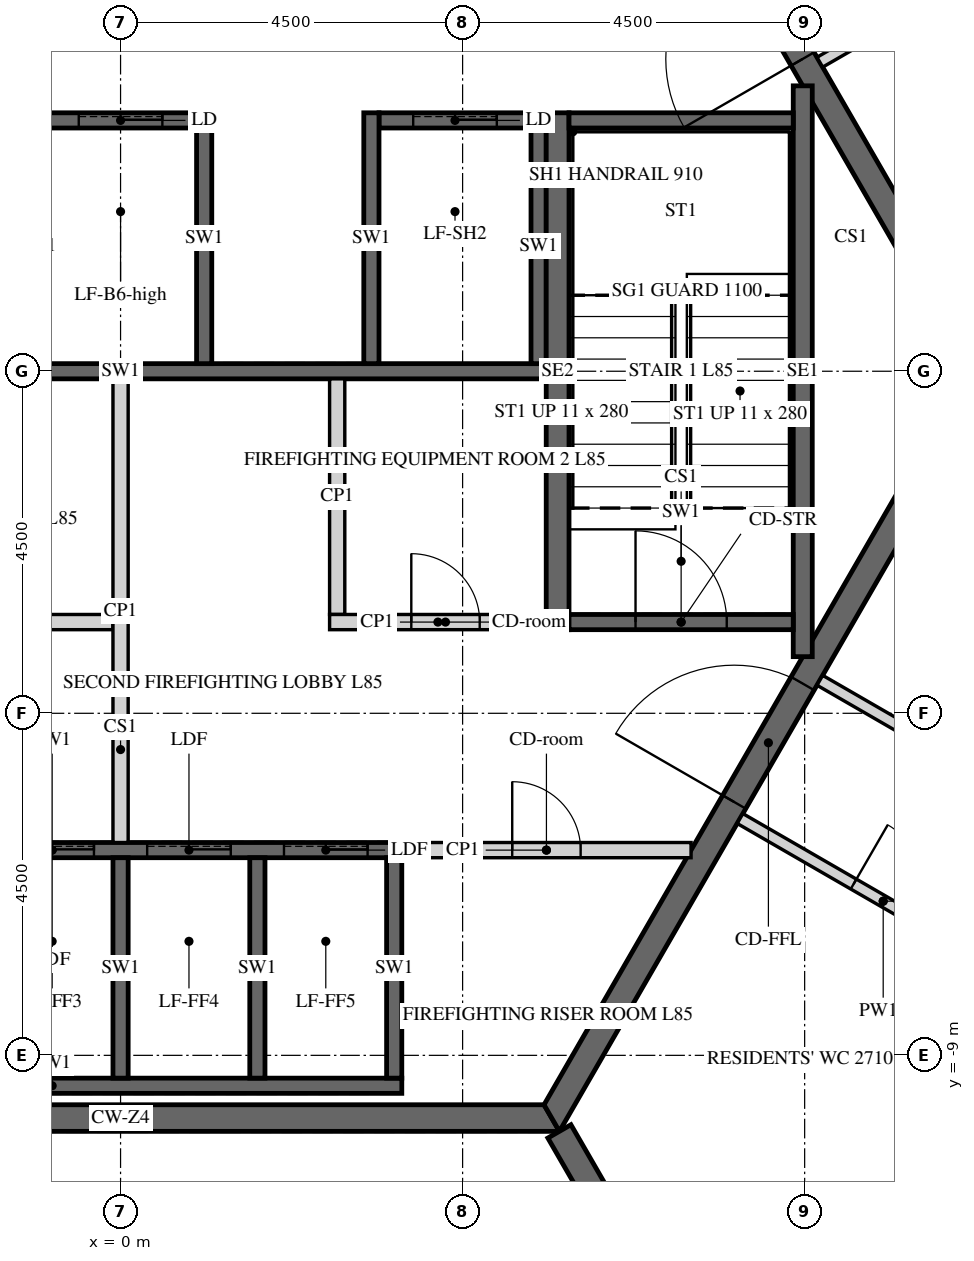
"""IFC4 building model, lengths in metres.
Left out: names, types, materials, properties, quantities, classifications, styles, units other than length and angle.
Written with IfcOpenShell. Run it as: python <this file> out.ifc"""

import sys

from ifc_helpers import new_model, si_unit, direction, frame, frame_2d, origin, place, context, subcontext, project, spatial, polyline, rectangle, outline, extrude, element, fill, save


model = new_model("IFC4")
c1 = context("Model", 3, precision=1e-05, world=origin(), true_north=direction((0.0, 1.0)))
c2 = subcontext(c1, "Body", "Model", "MODEL_VIEW")
j1 = project(units=[si_unit("LENGTHUNIT", "METRE"), si_unit("PLANEANGLEUNIT", "RADIAN")], contexts=[c1])
p1 = place(None, origin())
s1 = spatial("IfcSite", under=j1, at=p1, CompositionType="ELEMENT")
p2 = place(p1, origin())
s2 = spatial("IfcBuilding", under=s1, at=p2, CompositionType="ELEMENT")
p3 = place(p2, frame((0.0, 0.0, 353.4)))
s3 = spatial("IfcBuildingStorey", under=s2, at=p3, CompositionType="ELEMENT", Elevation=353.4)
p4 = place(p3, frame((-5.673, -9.825, -0.15), z_axis=(0.0, 0.0, 1.0), x_axis=(1.0, 0.0, 0.0)))
e1 = element("IfcWall", 1, at=p4, inside=s3, PredefinedType="SHEAR", context=c2, shape_type="SweptSolid", body=[
    extrude(outline(polyline([(-0.101, -0.175), (11.446, -0.175), (11.244, 0.175), (0.101, 0.175), (-0.101, -0.175)])), origin(), (0.0, 0.0, 1.0), 3.9),
])
p5 = place(p3, frame((5.673, -9.825, -0.15), z_axis=(0.0, 0.0, 1.0), x_axis=(0.499995046907, 0.866028263435, 0.0)))
e2 = element("IfcWall", 2, at=p5, inside=s3, PredefinedType="SHEAR", context=c2, shape_type="SweptSolid", body=[
    extrude(outline(polyline([(-0.101, -0.175), (11.446, -0.175), (11.244, 0.175), (0.101, 0.175), (-0.101, -0.175)])), origin(), (0.0, 0.0, 1.0), 3.9),
])
p6 = place(p5, frame((4.801, 0.0, 0.15)))
e3 = element("IfcOpeningElement", 3, at=p6, cuts=e2, PredefinedType="OPENING", context=c2, shape_type="SweptSolid", body=[
    extrude(rectangle(XDim=1.8, YDim=2.4, at=frame_2d((0.9, 1.2))), frame((0.0, 0.185, 0.0), z_axis=(0.0, -1.0, 0.0), x_axis=(1.0, 0.0, 0.0)), (0.0, 0.0, 1.0), 0.37),
])
p7 = place(p3, frame((11.345, 0.0, -0.15), z_axis=(0.0, 0.0, 1.0), x_axis=(-0.499995046907, 0.866028263435, 0.0)))
e4 = element("IfcWall", 4, at=p7, inside=s3, PredefinedType="SHEAR", context=c2, shape_type="SweptSolid", body=[
    extrude(outline(polyline([(-0.101, -0.175), (11.446, -0.175), (11.244, 0.175), (0.101, 0.175), (-0.101, -0.175)])), origin(), (0.0, 0.0, 1.0), 3.9),
])
p8 = place(p7, frame((4.744, 0.0, 0.15)))
e5 = element("IfcOpeningElement", 5, at=p8, cuts=e4, PredefinedType="OPENING", context=c2, shape_type="SweptSolid", body=[
    extrude(rectangle(XDim=1.8, YDim=2.4, at=frame_2d((0.9, 1.2))), frame((0.0, 0.185, 0.0), z_axis=(0.0, -1.0, 0.0), x_axis=(1.0, 0.0, 0.0)), (0.0, 0.0, 1.0), 0.37),
])
p9 = place(p3, frame((5.773, -10.0, -0.15), z_axis=(0.0, 0.0, 1.0), x_axis=(0.500007911273, -0.866020836161, 0.0)))
e6 = element("IfcWall", 6, at=p9, inside=s3, PredefinedType="SHEAR", context=c2, shape_type="SweptSolid", body=[
    extrude(rectangle(XDim=14.51, YDim=0.35, at=frame_2d((7.255, 0.0))), origin(), (0.0, 0.0, 1.0), 3.9),
])
p10 = place(p9, frame((6.355, 0.0, 0.15)))
e7 = element("IfcOpeningElement", 7, at=p10, cuts=e6, PredefinedType="OPENING", context=c2, shape_type="SweptSolid", body=[
    extrude(rectangle(XDim=1.8, YDim=2.4, at=frame_2d((0.9, 1.2))), frame((0.0, 0.185, 0.0), z_axis=(0.0, -1.0, 0.0), x_axis=(1.0, 0.0, 0.0)), (0.0, 0.0, 1.0), 0.37),
])
p11 = place(p3, frame((-5.6, 3.3, -0.25), z_axis=(0.0, 0.0, 1.0), x_axis=(1.0, 0.0, 0.0)))
e8 = element("IfcWall", 8, at=p11, inside=s3, PredefinedType="SHEAR", context=c2, shape_type="SweptSolid", body=[
    extrude(rectangle(XDim=6.6, YDim=0.2, at=frame_2d((3.3, 0.0))), origin(), (0.0, 0.0, 1.0), 3.9),
])
p12 = place(p11, frame((0.65, 0.0, 0.25)))
e9 = element("IfcOpeningElement", 9, at=p12, cuts=e8, PredefinedType="OPENING", context=c2, shape_type="SweptSolid", body=[
    extrude(rectangle(XDim=1.1, YDim=2.1, at=frame_2d((0.55, 1.05))), frame((0.0, 0.11, 0.0), z_axis=(0.0, -1.0, 0.0), x_axis=(1.0, 0.0, 0.0)), (0.0, 0.0, 1.0), 0.22),
])
p13 = place(p11, frame((2.85, 0.0, 0.25)))
e10 = element("IfcOpeningElement", 10, at=p13, cuts=e8, PredefinedType="OPENING", context=c2, shape_type="SweptSolid", body=[
    extrude(rectangle(XDim=1.1, YDim=2.1, at=frame_2d((0.55, 1.05))), frame((0.0, 0.11, 0.0), z_axis=(0.0, -1.0, 0.0), x_axis=(1.0, 0.0, 0.0)), (0.0, 0.0, 1.0), 0.22),
])
p14 = place(p11, frame((5.05, 0.0, 0.25)))
e11 = element("IfcOpeningElement", 11, at=p14, cuts=e8, PredefinedType="OPENING", context=c2, shape_type="SweptSolid", body=[
    extrude(rectangle(XDim=1.1, YDim=2.1, at=frame_2d((0.55, 1.05))), frame((0.0, 0.11, 0.0), z_axis=(0.0, -1.0, 0.0), x_axis=(1.0, 0.0, 0.0)), (0.0, 0.0, 1.0), 0.22),
])
p15 = place(p3, frame((3.4, 3.3, -0.25), z_axis=(0.0, 0.0, 1.0), x_axis=(1.0, 0.0, 0.0)))
e12 = element("IfcWall", 12, at=p15, inside=s3, PredefinedType="SHEAR", context=c2, shape_type="SweptSolid", body=[
    extrude(rectangle(XDim=2.2, YDim=0.2, at=frame_2d((1.1, 0.0))), origin(), (0.0, 0.0, 1.0), 3.9),
])
p16 = place(p15, frame((0.45, 0.0, 0.25)))
e13 = element("IfcOpeningElement", 13, at=p16, cuts=e12, PredefinedType="OPENING", context=c2, shape_type="SweptSolid", body=[
    extrude(rectangle(XDim=1.1, YDim=2.1, at=frame_2d((0.55, 1.05))), frame((0.0, 0.11, 0.0), z_axis=(0.0, -1.0, 0.0), x_axis=(1.0, 0.0, 0.0)), (0.0, 0.0, 1.0), 0.22),
])
p17 = place(p3, frame((-5.6, 0.0, -0.25), z_axis=(0.0, 0.0, 1.0), x_axis=(1.0, 0.0, 0.0)))
e14 = element("IfcWall", 14, at=p17, inside=s3, PredefinedType="SHEAR", context=c2, shape_type="SweptSolid", body=[
    extrude(rectangle(XDim=11.2, YDim=0.2, at=frame_2d((5.6, 0.0))), origin(), (0.0, 0.0, 1.0), 3.9),
])
for number, where, z_axis, x_axis in (
    (15, (1.1, 0.1, -0.25), (0.0, 0.0, 1.0), (0.0, 1.0, 0.0)),
    (16, (3.3, 0.1, -0.25), (0.0, 0.0, 1.0), (0.0, 1.0, 0.0)),
):
    element("IfcWall", number, at=place(p3, frame(where, z_axis=z_axis, x_axis=x_axis)), inside=s3, PredefinedType="SHEAR", context=c2, shape_type="SweptSolid", body=[
        extrude(rectangle(XDim=3.3, YDim=0.2, at=frame_2d((1.65, 0.0))), origin(), (0.0, 0.0, 1.0), 3.9),
    ])
p18 = place(p3, frame((5.5, 0.1, -0.25), z_axis=(0.0, 0.0, 1.0), x_axis=(0.0, 1.0, 0.0)))
e17 = element("IfcWall", 17, at=p18, inside=s3, PredefinedType="SHEAR", context=c2, shape_type="SweptSolid", body=[
    extrude(rectangle(XDim=3.1, YDim=0.2, at=frame_2d((1.55, 0.0))), origin(), (0.0, 0.0, 1.0), 3.9),
])
p19 = place(p3, frame((-5.5, -6.3, -0.25), z_axis=(0.0, 0.0, 1.0), x_axis=(1.0, 0.0, 0.0)))
e18 = element("IfcWall", 18, at=p19, inside=s3, PredefinedType="SHEAR", context=c2, shape_type="SweptSolid", body=[
    extrude(rectangle(XDim=9.2, YDim=0.2, at=frame_2d((4.6, 0.0))), origin(), (0.0, 0.0, 1.0), 3.9),
])
p20 = place(p19, frame((0.45, 0.0, 0.25)))
e19 = element("IfcOpeningElement", 19, at=p20, cuts=e18, PredefinedType="OPENING", context=c2, shape_type="SweptSolid", body=[
    extrude(rectangle(XDim=1.1, YDim=2.1, at=frame_2d((0.55, 1.05))), frame((0.0, 0.11, 0.0), z_axis=(0.0, -1.0, 0.0), x_axis=(1.0, 0.0, 0.0)), (0.0, 0.0, 1.0), 0.22),
])
p21 = place(p19, frame((2.25, 0.0, 0.25)))
e20 = element("IfcOpeningElement", 20, at=p21, cuts=e18, PredefinedType="OPENING", context=c2, shape_type="SweptSolid", body=[
    extrude(rectangle(XDim=1.1, YDim=2.1, at=frame_2d((0.55, 1.05))), frame((0.0, 0.11, 0.0), z_axis=(0.0, -1.0, 0.0), x_axis=(1.0, 0.0, 0.0)), (0.0, 0.0, 1.0), 0.22),
])
p22 = place(p19, frame((4.05, 0.0, 0.25)))
e21 = element("IfcOpeningElement", 21, at=p22, cuts=e18, PredefinedType="OPENING", context=c2, shape_type="SweptSolid", body=[
    extrude(rectangle(XDim=1.1, YDim=2.1, at=frame_2d((0.55, 1.05))), frame((0.0, 0.11, 0.0), z_axis=(0.0, -1.0, 0.0), x_axis=(1.0, 0.0, 0.0)), (0.0, 0.0, 1.0), 0.22),
])
p23 = place(p19, frame((5.85, 0.0, 0.25)))
e22 = element("IfcOpeningElement", 22, at=p23, cuts=e18, PredefinedType="OPENING", context=c2, shape_type="SweptSolid", body=[
    extrude(rectangle(XDim=1.1, YDim=2.1, at=frame_2d((0.55, 1.05))), frame((0.0, 0.11, 0.0), z_axis=(0.0, -1.0, 0.0), x_axis=(1.0, 0.0, 0.0)), (0.0, 0.0, 1.0), 0.22),
])
p24 = place(p19, frame((7.65, 0.0, 0.25)))
e23 = element("IfcOpeningElement", 23, at=p24, cuts=e18, PredefinedType="OPENING", context=c2, shape_type="SweptSolid", body=[
    extrude(rectangle(XDim=1.1, YDim=2.1, at=frame_2d((0.55, 1.05))), frame((0.0, 0.11, 0.0), z_axis=(0.0, -1.0, 0.0), x_axis=(1.0, 0.0, 0.0)), (0.0, 0.0, 1.0), 0.22),
])
p25 = place(p3, frame((-5.5, -9.4, -0.25), z_axis=(0.0, 0.0, 1.0), x_axis=(1.0, 0.0, 0.0)))
e24 = element("IfcWall", 24, at=p25, inside=s3, PredefinedType="SHEAR", context=c2, shape_type="SweptSolid", body=[
    extrude(rectangle(XDim=9.2, YDim=0.2, at=frame_2d((4.6, 0.0))), origin(), (0.0, 0.0, 1.0), 3.9),
])
for number, where, z_axis, x_axis in (
    (25, (0.0, -9.3, -0.25), (0.0, 0.0, 1.0), (0.0, 1.0, 0.0)),
    (26, (1.8, -9.3, -0.25), (0.0, 0.0, 1.0), (0.0, 1.0, 0.0)),
    (27, (3.6, -9.3, -0.25), (0.0, 0.0, 1.0), (0.0, 1.0, 0.0)),
):
    element("IfcWall", number, at=place(p3, frame(where, z_axis=z_axis, x_axis=x_axis)), inside=s3, PredefinedType="SHEAR", context=c2, shape_type="SweptSolid", body=[
        extrude(rectangle(XDim=2.9, YDim=0.2, at=frame_2d((1.45, 0.0))), origin(), (0.0, 0.0, 1.0), 3.9),
    ])
p26 = place(p3, frame((-5.6, -3.3, 0.0), z_axis=(0.0, 0.0, 1.0), x_axis=(1.0, 0.0, 0.0)))
e28 = element("IfcWall", 28, at=p26, inside=s3, PredefinedType="PARTITIONING", context=c2, shape_type="SweptSolid", body=[
    extrude(rectangle(XDim=5.5, YDim=0.2, at=frame_2d((2.75, 0.0))), origin(), (0.0, 0.0, 1.0), 3.65),
])
p27 = place(p26, frame((2.3, 0.0, 0.0)))
e29 = element("IfcOpeningElement", 29, at=p27, cuts=e28, PredefinedType="OPENING", context=c2, shape_type="SweptSolid", body=[
    extrude(rectangle(XDim=0.9, YDim=2.1, at=frame_2d((0.45, 1.05))), frame((0.0, 0.11, 0.0), z_axis=(0.0, -1.0, 0.0), x_axis=(1.0, 0.0, 0.0)), (0.0, 0.0, 1.0), 0.22),
])
p28 = place(p3, frame((2.75, -3.3, 0.0), z_axis=(0.0, 0.0, 1.0), x_axis=(1.0, 0.0, 0.0)))
e30 = element("IfcWall", 30, at=p28, inside=s3, PredefinedType="PARTITIONING", context=c2, shape_type="SweptSolid", body=[
    extrude(rectangle(XDim=2.85, YDim=0.2, at=frame_2d((1.425, 0.0))), origin(), (0.0, 0.0, 1.0), 3.65),
])
p29 = place(p28, frame((1.075, 0.0, 0.0)))
e31 = element("IfcOpeningElement", 31, at=p29, cuts=e30, PredefinedType="OPENING", context=c2, shape_type="SweptSolid", body=[
    extrude(rectangle(XDim=0.9, YDim=2.1, at=frame_2d((0.45, 1.05))), frame((0.0, 0.11, 0.0), z_axis=(0.0, -1.0, 0.0), x_axis=(1.0, 0.0, 0.0)), (0.0, 0.0, 1.0), 0.22),
])
p30 = place(p3, frame((2.85, -3.2, 0.0), z_axis=(0.0, 0.0, 1.0), x_axis=(0.0, 1.0, 0.0)))
e32 = element("IfcWall", 32, at=p30, inside=s3, PredefinedType="PARTITIONING", context=c2, shape_type="SweptSolid", body=[
    extrude(rectangle(XDim=3.1, YDim=0.2, at=frame_2d((1.55, 0.0))), origin(), (0.0, 0.0, 1.0), 3.65),
])
p31 = place(p3, frame((0.0, -6.2, 0.0), z_axis=(0.0, 0.0, 1.0), x_axis=(0.0, 1.0, 0.0)))
e33 = element("IfcWall", 33, at=p31, inside=s3, PredefinedType="PARTITIONING", context=c2, shape_type="SweptSolid", body=[
    extrude(rectangle(XDim=6.1, YDim=0.2, at=frame_2d((3.05, 0.0))), origin(), (0.0, 0.0, 1.0), 3.65),
])
p32 = place(p3, frame((3.7, -6.3, 0.0), z_axis=(0.0, 0.0, 1.0), x_axis=(1.0, 0.0, 0.0)))
e34 = element("IfcWall", 34, at=p32, inside=s3, PredefinedType="PARTITIONING", context=c2, shape_type="SweptSolid", body=[
    extrude(rectangle(XDim=3.806, YDim=0.2, at=frame_2d((1.903, 0.0))), origin(), (0.0, 0.0, 1.0), 3.65),
])
p33 = place(p32, frame((1.453, 0.0, 0.0)))
e35 = element("IfcOpeningElement", 35, at=p33, cuts=e34, PredefinedType="OPENING", context=c2, shape_type="SweptSolid", body=[
    extrude(rectangle(XDim=0.9, YDim=2.1, at=frame_2d((0.45, 1.05))), frame((0.0, 0.11, 0.0), z_axis=(0.0, -1.0, 0.0), x_axis=(1.0, 0.0, 0.0)), (0.0, 0.0, 1.0), 0.22),
])
p34 = place(p3, frame((5.75, -3.4, -0.25), z_axis=(0.0, 0.0, 1.0), x_axis=(0.0, 1.0, 0.0)))
e36 = element("IfcWall", 36, at=p34, inside=s3, PredefinedType="SHEAR", context=c2, shape_type="SweptSolid", body=[
    extrude(rectangle(XDim=6.8, YDim=0.3, at=frame_2d((3.4, 0.0))), origin(), (0.0, 0.0, 1.0), 3.9),
])
p35 = place(p3, frame((8.975, -3.755, -0.25), z_axis=(0.0, 0.0, 1.0), x_axis=(0.0, 1.0, 0.0)))
e37 = element("IfcWall", 37, at=p35, inside=s3, PredefinedType="SHEAR", context=c2, shape_type="SweptSolid", body=[
    extrude(rectangle(XDim=7.51, YDim=0.25, at=frame_2d((3.755, 0.0))), origin(), (0.0, 0.0, 1.0), 3.9),
])
p36 = place(p3, frame((5.9, 3.3, -0.25), z_axis=(0.0, 0.0, 1.0), x_axis=(1.0, 0.0, 0.0)))
e38 = element("IfcWall", 38, at=p36, inside=s3, PredefinedType="SHEAR", context=c2, shape_type="SweptSolid", body=[
    extrude(rectangle(XDim=2.95, YDim=0.2, at=frame_2d((1.475, 0.0))), origin(), (0.0, 0.0, 1.0), 3.9),
])
p37 = place(p3, frame((5.9, -3.3, -0.25), z_axis=(0.0, 0.0, 1.0), x_axis=(1.0, 0.0, 0.0)))
e39 = element("IfcWall", 39, at=p37, inside=s3, PredefinedType="SHEAR", context=c2, shape_type="SweptSolid", body=[
    extrude(rectangle(XDim=2.95, YDim=0.2, at=frame_2d((1.475, 0.0))), origin(), (0.0, 0.0, 1.0), 3.9),
])
p38 = place(p37, frame((0.875, 0.0, 0.25)))
e40 = element("IfcOpeningElement", 40, at=p38, cuts=e39, PredefinedType="OPENING", context=c2, shape_type="SweptSolid", body=[
    extrude(rectangle(XDim=1.2, YDim=2.4, at=frame_2d((0.6, 1.2))), frame((0.0, 0.11, 0.0), z_axis=(0.0, -1.0, 0.0), x_axis=(1.0, 0.0, 0.0)), (0.0, 0.0, 1.0), 0.22),
])
p39 = place(p3, frame((17.873, -1.193, 0.0), z_axis=(0.0, 0.0, 1.0), x_axis=(-0.559195650252, 0.829035719821, 0.0)))
e41 = element("IfcWall", 41, at=p39, inside=s3, PredefinedType="PARTITIONING", context=c2, shape_type="SweptSolid", body=[
    extrude(rectangle(XDim=15.688, YDim=0.15, at=frame_2d((7.844, 0.0))), origin(), (0.0, 0.0, 1.0), 2.82),
])
p40 = place(p39, frame((5.792, 0.0, 0.0)))
e42 = element("IfcOpeningElement", 42, at=p40, cuts=e41, PredefinedType="OPENING", context=c2, shape_type="SweptSolid", body=[
    extrude(rectangle(XDim=1.0, YDim=2.1, at=frame_2d((0.5, 1.05))), frame((0.0, 0.085, 0.0), z_axis=(0.0, -1.0, 0.0), x_axis=(1.0, 0.0, 0.0)), (0.0, 0.0, 1.0), 0.17),
])
p41 = place(p3, frame((9.2, 4.066, 0.0), z_axis=(0.0, 0.0, 1.0), x_axis=(0.866038240688, 0.499977765172, 0.0)))
e43 = element("IfcWall", 43, at=p41, inside=s3, PredefinedType="PARTITIONING", context=c2, shape_type="SweptSolid", body=[
    extrude(rectangle(XDim=2.456, YDim=0.15, at=frame_2d((1.228, 0.0))), origin(), (0.0, 0.0, 1.0), 2.82),
])
p42 = place(p3, frame((12.902, -6.203, 0.0), z_axis=(0.0, 0.0, 1.0), x_axis=(-0.866023907196, 0.500002592159, 0.0)))
e44 = element("IfcWall", 44, at=p42, inside=s3, PredefinedType="PARTITIONING", context=c2, shape_type="SweptSolid", body=[
    extrude(rectangle(XDim=4.275, YDim=0.15, at=frame_2d((2.137, 0.0))), origin(), (0.0, 0.0, 1.0), 2.82),
])
p43 = place(p3, frame((8.15, -5.884, 0.0), z_axis=(0.0, 0.0, 1.0), x_axis=(0.866027639635, -0.499996127374, 0.0)))
e45 = element("IfcWall", 45, at=p43, inside=s3, PredefinedType="PARTITIONING", context=c2, shape_type="SweptSolid", body=[
    extrude(rectangle(XDim=4.35, YDim=0.15, at=frame_2d((2.175, 0.0))), origin(), (0.0, 0.0, 1.0), 2.82),
])
p44 = place(p43, frame((1.725, 0.0, 0.0)))
e46 = element("IfcOpeningElement", 46, at=p44, cuts=e45, PredefinedType="OPENING", context=c2, shape_type="SweptSolid", body=[
    extrude(rectangle(XDim=0.9, YDim=2.1, at=frame_2d((0.45, 1.05))), frame((0.0, 0.085, 0.0), z_axis=(0.0, -1.0, 0.0), x_axis=(1.0, 0.0, 0.0)), (0.0, 0.0, 1.0), 0.17),
])
p45 = place(p3, frame((11.879, -8.124, 0.0), z_axis=(0.0, 0.0, 1.0), x_axis=(-0.500006178143, -0.866021836803, 0.0)))
e47 = element("IfcWall", 47, at=p45, inside=s3, PredefinedType="PARTITIONING", context=c2, shape_type="SweptSolid", body=[
    extrude(rectangle(XDim=4.122, YDim=0.15, at=frame_2d((2.061, 0.0))), origin(), (0.0, 0.0, 1.0), 2.82),
])
p46 = place(p8, origin())
e48 = element("IfcDoor", 48, at=p46, inside=s3, OperationType="DOUBLE_DOOR_SINGLE_SWING", PredefinedType="DOOR", context=c2, shape_type="SweptSolid", body=[
    extrude(rectangle(XDim=1.8, YDim=2.4, at=frame_2d((0.9, 1.2))), frame((0.0, 0.025, 0.0), z_axis=(0.0, -1.0, 0.0), x_axis=(1.0, 0.0, 0.0)), (0.0, 0.0, 1.0), 0.05),
])
fill(e5, e48)
p47 = place(p6, origin())
e49 = element("IfcDoor", 49, at=p47, inside=s3, OperationType="DOUBLE_DOOR_SINGLE_SWING", PredefinedType="DOOR", context=c2, shape_type="SweptSolid", body=[
    extrude(rectangle(XDim=1.8, YDim=2.4, at=frame_2d((0.9, 1.2))), frame((0.0, 0.025, 0.0), z_axis=(0.0, -1.0, 0.0), x_axis=(1.0, 0.0, 0.0)), (0.0, 0.0, 1.0), 0.05),
])
fill(e3, e49)
p48 = place(p29, origin())
e50 = element("IfcDoor", 50, at=p48, inside=s3, OperationType="SINGLE_SWING_LEFT", PredefinedType="DOOR", context=c2, shape_type="SweptSolid", body=[
    extrude(rectangle(XDim=0.9, YDim=2.1, at=frame_2d((0.45, 1.05))), frame((0.0, 0.025, 0.0), z_axis=(0.0, -1.0, 0.0), x_axis=(1.0, 0.0, 0.0)), (0.0, 0.0, 1.0), 0.05),
])
fill(e31, e50)
p49 = place(p33, origin())
e51 = element("IfcDoor", 51, at=p49, inside=s3, OperationType="SINGLE_SWING_LEFT", PredefinedType="DOOR", context=c2, shape_type="SweptSolid", body=[
    extrude(rectangle(XDim=0.9, YDim=2.1, at=frame_2d((0.45, 1.05))), frame((0.0, 0.025, 0.0), z_axis=(0.0, -1.0, 0.0), x_axis=(1.0, 0.0, 0.0)), (0.0, 0.0, 1.0), 0.05),
])
fill(e35, e51)
p50 = place(p38, origin())
e52 = element("IfcDoor", 52, at=p50, inside=s3, OperationType="SINGLE_SWING_LEFT", PredefinedType="DOOR", context=c2, shape_type="SweptSolid", body=[
    extrude(rectangle(XDim=1.2, YDim=2.4, at=frame_2d((0.6, 1.2))), frame((0.0, 0.025, 0.0), z_axis=(0.0, -1.0, 0.0), x_axis=(1.0, 0.0, 0.0)), (0.0, 0.0, 1.0), 0.05),
])
fill(e40, e52)
p51 = place(p14, origin())
e53 = element("IfcDoor", 53, at=p51, inside=s3, OperationType="SLIDING_TO_LEFT", PredefinedType="DOOR", context=c2, shape_type="SweptSolid", body=[
    extrude(rectangle(XDim=1.1, YDim=2.1, at=frame_2d((0.55, 1.05))), frame((0.0, 0.025, 0.0), z_axis=(0.0, -1.0, 0.0), x_axis=(1.0, 0.0, 0.0)), (0.0, 0.0, 1.0), 0.05),
])
fill(e11, e53)
p52 = place(p16, origin())
e54 = element("IfcDoor", 54, at=p52, inside=s3, OperationType="SLIDING_TO_LEFT", PredefinedType="DOOR", context=c2, shape_type="SweptSolid", body=[
    extrude(rectangle(XDim=1.1, YDim=2.1, at=frame_2d((0.55, 1.05))), frame((0.0, 0.025, 0.0), z_axis=(0.0, -1.0, 0.0), x_axis=(1.0, 0.0, 0.0)), (0.0, 0.0, 1.0), 0.05),
])
fill(e13, e54)
p53 = place(p22, origin())
e55 = element("IfcDoor", 55, at=p53, inside=s3, OperationType="SLIDING_TO_LEFT", PredefinedType="DOOR", context=c2, shape_type="SweptSolid", body=[
    extrude(rectangle(XDim=1.1, YDim=2.1, at=frame_2d((0.55, 1.05))), frame((0.0, 0.025, 0.0), z_axis=(0.0, -1.0, 0.0), x_axis=(1.0, 0.0, 0.0)), (0.0, 0.0, 1.0), 0.05),
])
fill(e21, e55)
p54 = place(p23, origin())
e56 = element("IfcDoor", 56, at=p54, inside=s3, OperationType="SLIDING_TO_LEFT", PredefinedType="DOOR", context=c2, shape_type="SweptSolid", body=[
    extrude(rectangle(XDim=1.1, YDim=2.1, at=frame_2d((0.55, 1.05))), frame((0.0, 0.025, 0.0), z_axis=(0.0, -1.0, 0.0), x_axis=(1.0, 0.0, 0.0)), (0.0, 0.0, 1.0), 0.05),
])
fill(e22, e56)
p55 = place(p24, origin())
e57 = element("IfcDoor", 57, at=p55, inside=s3, OperationType="SLIDING_TO_LEFT", PredefinedType="DOOR", context=c2, shape_type="SweptSolid", body=[
    extrude(rectangle(XDim=1.1, YDim=2.1, at=frame_2d((0.55, 1.05))), frame((0.0, 0.025, 0.0), z_axis=(0.0, -1.0, 0.0), x_axis=(1.0, 0.0, 0.0)), (0.0, 0.0, 1.0), 0.05),
])
fill(e23, e57)
p56 = place(p44, origin())
e58 = element("IfcDoor", 58, at=p56, inside=s3, OperationType="SINGLE_SWING_LEFT", PredefinedType="DOOR", context=c2, shape_type="SweptSolid", body=[
    extrude(rectangle(XDim=0.9, YDim=2.1, at=frame_2d((0.45, 1.05))), frame((0.0, 0.025, 0.0), z_axis=(0.0, -1.0, 0.0), x_axis=(1.0, 0.0, 0.0)), (0.0, 0.0, 1.0), 0.05),
])
fill(e46, e58)
save(model, sys.argv[1])
